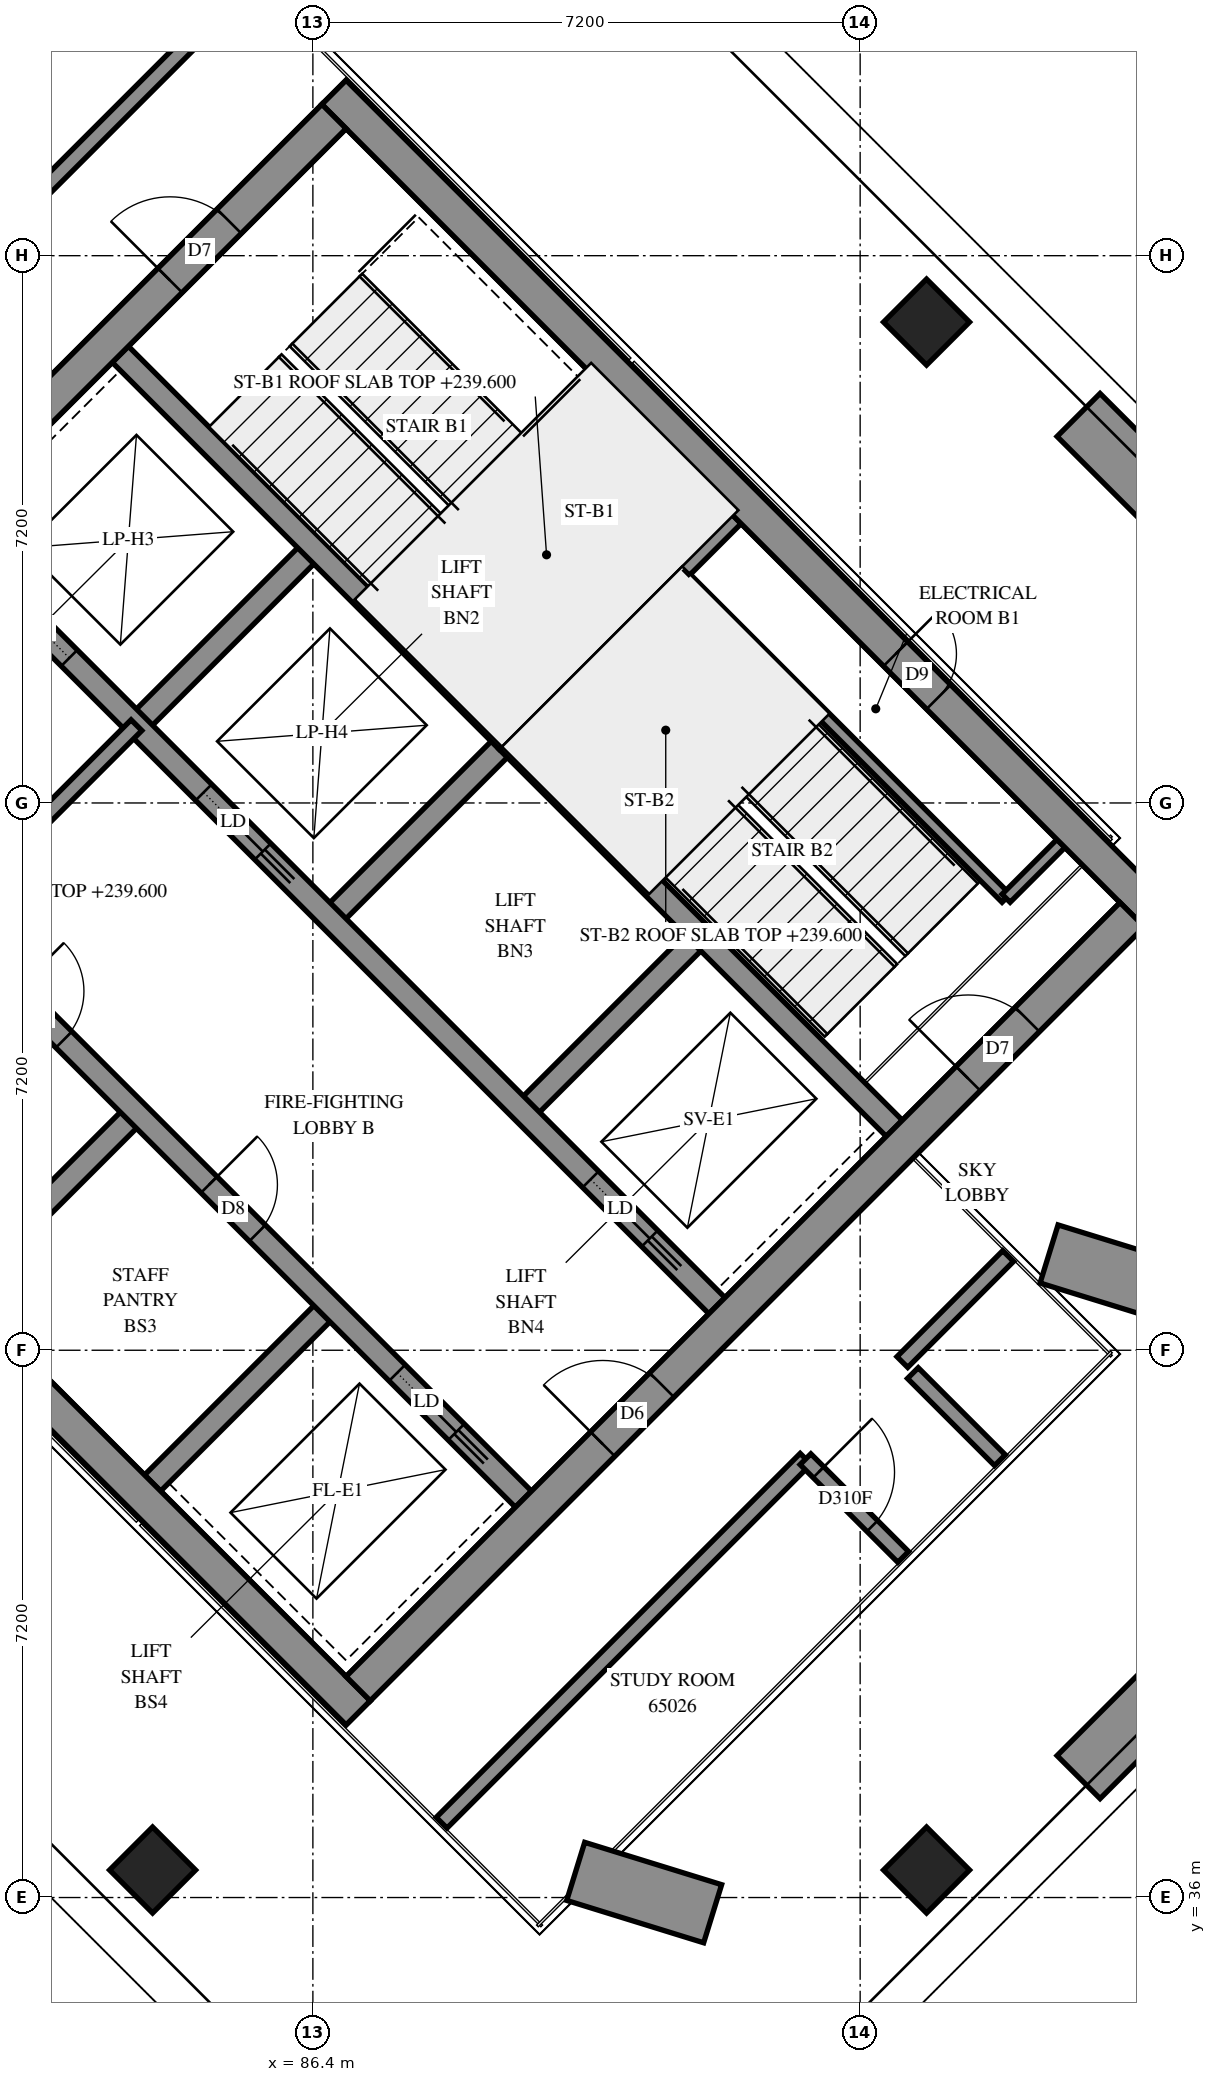
"""IFC4 building model, lengths in metres.
Left out: names, types, materials, properties, quantities, classifications, styles, units other than length and angle.
Written with IfcOpenShell. Run it as: python <this file> out.ifc"""

import sys

from ifc_helpers import new_model, si_unit, direction, frame, frame_2d, origin, origin_2d, place, context, subcontext, project, spatial, rectangle, extrude, element, fill, save


model = new_model("IFC4")
c1 = context("Model", 3, precision=1e-05, world=origin(), true_north=direction((0.0, 1.0)))
c2 = subcontext(c1, "Body", "Model", "MODEL_VIEW")
j1 = project(units=[si_unit("LENGTHUNIT", "METRE"), si_unit("PLANEANGLEUNIT", "RADIAN")], contexts=[c1])
p1 = place(None, origin())
s1 = spatial("IfcSite", under=j1, at=p1, CompositionType="ELEMENT")
p2 = place(p1, origin())
s2 = spatial("IfcBuilding", under=s1, at=p2, CompositionType="ELEMENT")
p3 = place(p2, frame((0.0, 0.0, 239.6)))
s3 = spatial("IfcBuildingStorey", under=s2, at=p3, CompositionType="ELEMENT", Elevation=239.6)
for number, where, z_axis, x_axis in (
    (1, (94.474, 56.727, 0.0), (0.0, 0.0, 1.0), (0.707, -0.707, 0.0)),
    (2, (84.291, 36.362, 0.0), (0.0, 0.0, 1.0), (0.707, -0.707, 0.0)),
    (3, (94.474, 36.362, 0.0), (0.0, 0.0, 1.0), (0.707, -0.707, 0.0)),
):
    element("IfcColumn", number, at=place(p3, frame(where, z_axis=z_axis, x_axis=x_axis)), inside=s3, PredefinedType="COLUMN", context=c2, shape_type="SweptSolid", body=[
        extrude(rectangle(XDim=0.8, YDim=0.8, at=origin_2d()), origin(), (0.0, 0.0, 1.0), 3.9),
    ])
p4 = place(p3, frame((76.177, 49.249, -0.3), z_axis=(0.0, 0.0, 1.0), x_axis=(0.7071100491, -0.7071035132, 0.0)))
e4 = element("IfcWall", 4, at=p4, inside=s3, PredefinedType="SHEAR", context=c2, shape_type="SweptSolid", body=[
    extrude(rectangle(XDim=15.3, YDim=0.45, at=frame_2d((7.65, 0.0))), origin(), (0.0, 0.0, 1.0), 3.5),
])
p5 = place(p3, frame((86.678, 59.749, -0.3), z_axis=(0.0, 0.0, 1.0), x_axis=(0.7071035132, -0.7071100491, 0.0)))
e5 = element("IfcWall", 5, at=p5, inside=s3, PredefinedType="SHEAR", context=c2, shape_type="SweptSolid", body=[
    extrude(rectangle(XDim=15.3, YDim=0.45, at=frame_2d((7.65, 0.0))), origin(), (0.0, 0.0, 1.0), 3.5),
])
p6 = place(p5, frame((10.45, 0.0, 0.3)))
e6 = element("IfcOpeningElement", 6, at=p6, cuts=e5, PredefinedType="OPENING", context=c2, shape_type="SweptSolid", body=[
    extrude(rectangle(XDim=0.8, YDim=2.1, at=frame_2d((0.4, 1.05))), frame((0.0, 0.235, 0.0), z_axis=(0.0, -1.0, 0.0), x_axis=(1.0, 0.0, 0.0)), (0.0, 0.0, 1.0), 0.47),
])
p7 = place(p3, frame((76.495, 49.249, -0.3), z_axis=(0.0, 0.0, 1.0), x_axis=(0.7071067812, 0.7071067812, 0.0)))
e7 = element("IfcWall", 7, at=p7, inside=s3, PredefinedType="SHEAR", context=c2, shape_type="SweptSolid", body=[
    extrude(rectangle(XDim=14.4, YDim=0.45, at=frame_2d((7.2, 0.0))), origin(), (0.0, 0.0, 1.0), 3.5),
])
p8 = place(p7, frame((4.55, 0.0, 0.3)))
e8 = element("IfcOpeningElement", 8, at=p8, cuts=e7, PredefinedType="OPENING", context=c2, shape_type="SweptSolid", body=[
    extrude(rectangle(XDim=1.1, YDim=2.1, at=frame_2d((0.55, 1.05))), frame((0.0, 0.235, 0.0), z_axis=(0.0, -1.0, 0.0), x_axis=(1.0, 0.0, 0.0)), (0.0, 0.0, 1.0), 0.47),
])
p9 = place(p7, frame((11.35, 0.0, 0.3)))
e9 = element("IfcOpeningElement", 9, at=p9, cuts=e7, PredefinedType="OPENING", context=c2, shape_type="SweptSolid", body=[
    extrude(rectangle(XDim=1.1, YDim=2.1, at=frame_2d((0.55, 1.05))), frame((0.0, 0.235, 0.0), z_axis=(0.0, -1.0, 0.0), x_axis=(1.0, 0.0, 0.0)), (0.0, 0.0, 1.0), 0.47),
])
p10 = place(p3, frame((86.996, 38.748, -0.3), z_axis=(0.0, 0.0, 1.0), x_axis=(0.7071067812, 0.7071067812, 0.0)))
e10 = element("IfcWall", 10, at=p10, inside=s3, PredefinedType="SHEAR", context=c2, shape_type="SweptSolid", body=[
    extrude(rectangle(XDim=14.4, YDim=0.45, at=frame_2d((7.2, 0.0))), origin(), (0.0, 0.0, 1.0), 3.5),
])
p11 = place(p10, frame((4.55, 0.0, 0.3)))
e11 = element("IfcOpeningElement", 11, at=p11, cuts=e10, PredefinedType="OPENING", context=c2, shape_type="SweptSolid", body=[
    extrude(rectangle(XDim=1.1, YDim=2.1, at=frame_2d((0.55, 1.05))), frame((0.0, 0.235, 0.0), z_axis=(0.0, -1.0, 0.0), x_axis=(1.0, 0.0, 0.0)), (0.0, 0.0, 1.0), 0.47),
])
p12 = place(p10, frame((11.35, 0.0, 0.3)))
e12 = element("IfcOpeningElement", 12, at=p12, cuts=e10, PredefinedType="OPENING", context=c2, shape_type="SweptSolid", body=[
    extrude(rectangle(XDim=1.1, YDim=2.1, at=frame_2d((0.55, 1.05))), frame((0.0, 0.235, 0.0), z_axis=(0.0, -1.0, 0.0), x_axis=(1.0, 0.0, 0.0)), (0.0, 0.0, 1.0), 0.47),
])
p13 = place(p3, frame((84.079, 51.423, 0.0), z_axis=(0.0, 0.0, 1.0), x_axis=(0.7071219326, 0.7070916295, 0.0)))
e13 = element("IfcWall", 13, at=p13, inside=s3, PredefinedType="SOLIDWALL", context=c2, shape_type="SweptSolid", body=[
    extrude(rectangle(XDim=3.3, YDim=0.3, at=frame_2d((1.65, 0.0))), origin(), (0.0, 0.0, 1.0), 3.9),
])
p14 = place(p3, frame((81.746, 43.999, 0.0), z_axis=(0.0, 0.0, 1.0), x_axis=(0.7071067812, 0.7071067812, 0.0)))
e14 = element("IfcWall", 14, at=p14, inside=s3, PredefinedType="SOLIDWALL", context=c2, shape_type="SweptSolid", body=[
    extrude(rectangle(XDim=3.3, YDim=0.3, at=frame_2d((1.65, 0.0))), origin(), (0.0, 0.0, 1.0), 3.9),
])
p15 = place(p3, frame((86.625, 48.878, 0.0), z_axis=(0.0, 0.0, 1.0), x_axis=(0.7071067812, 0.7071067812, 0.0)))
e15 = element("IfcWall", 15, at=p15, inside=s3, PredefinedType="SOLIDWALL", context=c2, shape_type="SweptSolid", body=[
    extrude(rectangle(XDim=3.3, YDim=0.3, at=frame_2d((1.65, 0.0))), origin(), (0.0, 0.0, 1.0), 3.9),
])
p16 = place(p3, frame((84.291, 41.453, 0.0), z_axis=(0.0, 0.0, 1.0), x_axis=(0.7071067812, 0.7071067812, 0.0)))
e16 = element("IfcWall", 16, at=p16, inside=s3, PredefinedType="SOLIDWALL", context=c2, shape_type="SweptSolid", body=[
    extrude(rectangle(XDim=3.3, YDim=0.3, at=frame_2d((1.65, 0.0))), origin(), (0.0, 0.0, 1.0), 3.9),
])
p17 = place(p3, frame((89.17, 46.332, 0.0), z_axis=(0.0, 0.0, 1.0), x_axis=(0.7071067812, 0.7071067812, 0.0)))
e17 = element("IfcWall", 17, at=p17, inside=s3, PredefinedType="SOLIDWALL", context=c2, shape_type="SweptSolid", body=[
    extrude(rectangle(XDim=3.3, YDim=0.3, at=frame_2d((1.65, 0.0))), origin(), (0.0, 0.0, 1.0), 3.9),
])
p18 = place(p3, frame((78.988, 51.423, 0.0), z_axis=(0.0, 0.0, 1.0), x_axis=(0.7071067812, -0.7071067812, 0.0)))
e18 = element("IfcWall", 18, at=p18, inside=s3, PredefinedType="SOLIDWALL", context=c2, shape_type="SweptSolid", body=[
    extrude(rectangle(XDim=14.4, YDim=0.3, at=frame_2d((7.2, 0.0))), origin(), (0.0, 0.0, 1.0), 3.9),
])
p19 = place(p18, frame((1.35, 0.0, 0.0)))
e19 = element("IfcOpeningElement", 19, at=p19, cuts=e18, PredefinedType="OPENING", context=c2, shape_type="SweptSolid", body=[
    extrude(rectangle(XDim=0.9, YDim=2.1, at=frame_2d((0.45, 1.05))), frame((0.0, 0.16, 0.0), z_axis=(0.0, -1.0, 0.0), x_axis=(1.0, 0.0, 0.0)), (0.0, 0.0, 1.0), 0.32),
])
p20 = place(p18, frame((4.95, 0.0, 0.0)))
e20 = element("IfcOpeningElement", 20, at=p20, cuts=e18, PredefinedType="OPENING", context=c2, shape_type="SweptSolid", body=[
    extrude(rectangle(XDim=0.9, YDim=2.1, at=frame_2d((0.45, 1.05))), frame((0.0, 0.16, 0.0), z_axis=(0.0, -1.0, 0.0), x_axis=(1.0, 0.0, 0.0)), (0.0, 0.0, 1.0), 0.32),
])
p21 = place(p18, frame((8.55, 0.0, 0.0)))
e21 = element("IfcOpeningElement", 21, at=p21, cuts=e18, PredefinedType="OPENING", context=c2, shape_type="SweptSolid", body=[
    extrude(rectangle(XDim=0.9, YDim=2.1, at=frame_2d((0.45, 1.05))), frame((0.0, 0.16, 0.0), z_axis=(0.0, -1.0, 0.0), x_axis=(1.0, 0.0, 0.0)), (0.0, 0.0, 1.0), 0.32),
])
p22 = place(p18, frame((12.05, 0.0, 0.0)))
e22 = element("IfcOpeningElement", 22, at=p22, cuts=e18, PredefinedType="OPENING", context=c2, shape_type="SweptSolid", body=[
    extrude(rectangle(XDim=1.1, YDim=2.1, at=frame_2d((0.55, 1.05))), frame((0.0, 0.16, 0.0), z_axis=(0.0, -1.0, 0.0), x_axis=(1.0, 0.0, 0.0)), (0.0, 0.0, 1.0), 0.32),
])
p23 = place(p3, frame((81.534, 53.969, 0.0), z_axis=(0.0, 0.0, 1.0), x_axis=(0.707103309, -0.7071102534, 0.0)))
e23 = element("IfcWall", 23, at=p23, inside=s3, PredefinedType="SOLIDWALL", context=c2, shape_type="SweptSolid", body=[
    extrude(rectangle(XDim=14.4, YDim=0.3, at=frame_2d((7.2, 0.0))), origin(), (0.0, 0.0, 1.0), 3.9),
])
p24 = place(p23, frame((1.25, 0.0, 0.0)))
e24 = element("IfcOpeningElement", 24, at=p24, cuts=e23, PredefinedType="OPENING", context=c2, shape_type="SweptSolid", body=[
    extrude(rectangle(XDim=1.1, YDim=2.1, at=frame_2d((0.55, 1.05))), frame((0.0, 0.16, 0.0), z_axis=(0.0, -1.0, 0.0), x_axis=(1.0, 0.0, 0.0)), (0.0, 0.0, 1.0), 0.32),
])
p25 = place(p23, frame((4.85, 0.0, 0.0)))
e25 = element("IfcOpeningElement", 25, at=p25, cuts=e23, PredefinedType="OPENING", context=c2, shape_type="SweptSolid", body=[
    extrude(rectangle(XDim=1.1, YDim=2.1, at=frame_2d((0.55, 1.05))), frame((0.0, 0.16, 0.0), z_axis=(0.0, -1.0, 0.0), x_axis=(1.0, 0.0, 0.0)), (0.0, 0.0, 1.0), 0.32),
])
p26 = place(p23, frame((12.05, 0.0, 0.0)))
e26 = element("IfcOpeningElement", 26, at=p26, cuts=e23, PredefinedType="OPENING", context=c2, shape_type="SweptSolid", body=[
    extrude(rectangle(XDim=1.1, YDim=2.1, at=frame_2d((0.55, 1.05))), frame((0.0, 0.16, 0.0), z_axis=(0.0, -1.0, 0.0), x_axis=(1.0, 0.0, 0.0)), (0.0, 0.0, 1.0), 0.32),
])
for number, where, z_axis, x_axis in (
    (27, (83.867, 56.302, 0.0), (0.0, 0.0, 1.0), (0.707, -0.707, 0.0)),
    (28, (88.958, 51.211, 0.0), (0.0, 0.0, 1.0), (0.707, -0.707, 0.0)),
):
    element("IfcWall", number, at=place(p3, frame(where, z_axis=z_axis, x_axis=x_axis)), inside=s3, PredefinedType="SOLIDWALL", context=c2, shape_type="SweptSolid", body=[
        extrude(rectangle(XDim=7.2, YDim=0.3, at=frame_2d((3.6, 0.0))), origin(), (0.0, 0.0, 1.0), 3.9),
    ])
p27 = place(p3, frame((88.958, 51.211, 0.0), z_axis=(0.0, 0.0, 1.0), x_axis=(0.7071067812, 0.7071067812, 0.0)))
e29 = element("IfcWall", 29, at=p27, inside=s3, PredefinedType="SOLIDWALL", context=c2, shape_type="SweptSolid", body=[
    extrude(rectangle(XDim=4.2, YDim=0.3, at=frame_2d((2.1, 0.0))), origin(), (0.0, 0.0, 1.0), 3.9),
])
for number, where, z_axis, x_axis in (
    (30, (96.474, 37.584, 0.0), (0.0, 0.0, 1.0), (0.707, 0.707, 0.0)),
    (31, (98.343, 53.635, 0.0), (0.0, 0.0, 1.0), (-0.707, 0.707, 0.0)),
):
    element("IfcWall", number, at=place(p3, frame(where, z_axis=z_axis, x_axis=x_axis)), inside=s3, PredefinedType="SOLIDWALL", context=c2, shape_type="SweptSolid", body=[
        extrude(rectangle(XDim=2.643, YDim=0.8, at=frame_2d((1.322, 0.0))), origin(), (0.0, 0.0, 1.0), 0.65),
    ])
p28 = place(p3, frame((99.073, 43.543, 0.0), z_axis=(0.0, 0.0, 1.0), x_axis=(-0.9553611302, 0.295440537, 0.0)))
e32 = element("IfcWall", 32, at=p28, inside=s3, PredefinedType="SOLIDWALL", context=c2, shape_type="SweptSolid", body=[
    extrude(rectangle(XDim=3.127, YDim=0.8, at=frame_2d((1.564, 0.0))), origin(), (0.0, 0.0, 1.0), 0.65),
])
p29 = place(p3, frame((91.659, 35.787, 0.0), z_axis=(0.0, 0.0, 1.0), x_axis=(-0.9553618261, 0.2954382866, 0.0)))
e33 = element("IfcWall", 33, at=p29, inside=s3, PredefinedType="SOLIDWALL", context=c2, shape_type="SweptSolid", body=[
    extrude(rectangle(XDim=1.886, YDim=0.8, at=frame_2d((0.943, 0.0))), origin(), (0.0, 0.0, 1.0), 0.65),
])
p30 = place(p3, frame((91.313, 53.354, 0.0), z_axis=(0.0, 0.0, 1.0), x_axis=(0.7071067812, -0.7071067812, 0.0)))
e34 = element("IfcWall", 34, at=p30, inside=s3, PredefinedType="PARTITIONING", context=c2, shape_type="SweptSolid", body=[
    extrude(rectangle(XDim=5.95, YDim=0.15, at=frame_2d((2.975, 0.0))), origin(), (0.0, 0.0, 1.0), 3.9),
])
p31 = place(p3, frame((95.52, 49.146, 0.0), z_axis=(0.0, 0.0, 1.0), x_axis=(0.7071067812, 0.7071067812, 0.0)))
e35 = element("IfcWall", 35, at=p31, inside=s3, PredefinedType="PARTITIONING", context=c2, shape_type="SweptSolid", body=[
    extrude(rectangle(XDim=1.02, YDim=0.15, at=frame_2d((0.51, 0.0))), origin(), (0.0, 0.0, 1.0), 3.9),
])
p32 = place(p3, frame((81.534, 48.878, 0.0), z_axis=(0.0, 0.0, 1.0), x_axis=(0.707092892, 0.7071206701, 0.0)))
e36 = element("IfcWall", 36, at=p32, inside=s3, PredefinedType="PARTITIONING", context=c2, shape_type="SweptSolid", body=[
    extrude(rectangle(XDim=3.6, YDim=0.2, at=frame_2d((1.8, 0.0))), origin(), (0.0, 0.0, 1.0), 3.9),
])
p33 = place(p3, frame((88.094, 36.984, 0.0), z_axis=(0.0, 0.0, 1.0), x_axis=(0.7071067812, 0.7071067812, 0.0)))
e37 = element("IfcWall", 37, at=p33, inside=s3, PredefinedType="PARTITIONING", context=c2, shape_type="SweptSolid", body=[
    extrude(rectangle(XDim=6.771, YDim=0.2, at=frame_2d((3.386, 0.0))), origin(), (0.0, 0.0, 1.0), 3.9),
])
p34 = place(p3, frame((80.852, 56.471, 0.0), z_axis=(0.0, 0.0, 1.0), x_axis=(0.7071067812, 0.7071067812, 0.0)))
e38 = element("IfcWall", 38, at=p34, inside=s3, PredefinedType="PARTITIONING", context=c2, shape_type="SweptSolid", body=[
    extrude(rectangle(XDim=6.684, YDim=0.2, at=frame_2d((3.342, 0.0))), origin(), (0.0, 0.0, 1.0), 3.9),
])
p35 = place(p34, frame((0.832, 0.0, 0.0)))
e39 = element("IfcOpeningElement", 39, at=p35, cuts=e38, PredefinedType="OPENING", context=c2, shape_type="SweptSolid", body=[
    extrude(rectangle(XDim=1.0, YDim=2.1, at=frame_2d((0.5, 1.05))), frame((0.0, 0.11, 0.0), z_axis=(0.0, -1.0, 0.0), x_axis=(1.0, 0.0, 0.0)), (0.0, 0.0, 1.0), 0.22),
])
p36 = place(p3, frame((94.155, 43.045, 0.0), z_axis=(0.0, 0.0, 1.0), x_axis=(0.7065989848, 0.7076142132, 0.0)))
e40 = element("IfcWall", 40, at=p36, inside=s3, PredefinedType="PARTITIONING", context=c2, shape_type="SweptSolid", body=[
    extrude(rectangle(XDim=1.97, YDim=0.2, at=frame_2d((0.985, 0.0))), origin(), (0.0, 0.0, 1.0), 3.9),
])
p37 = place(p3, frame((92.881, 41.767, 0.0), z_axis=(0.0, 0.0, 1.0), x_axis=(0.7071067812, -0.7071067812, 0.0)))
e41 = element("IfcWall", 41, at=p37, inside=s3, PredefinedType="PARTITIONING", context=c2, shape_type="SweptSolid", body=[
    extrude(rectangle(XDim=1.819, YDim=0.2, at=frame_2d((0.909, 0.0))), origin(), (0.0, 0.0, 1.0), 3.9),
])
p38 = place(p37, frame((0.243, 0.0, 0.0)))
e42 = element("IfcOpeningElement", 42, at=p38, cuts=e41, PredefinedType="OPENING", context=c2, shape_type="SweptSolid", body=[
    extrude(rectangle(XDim=1.0, YDim=2.1, at=frame_2d((0.5, 1.05))), frame((0.0, 0.11, 0.0), z_axis=(0.0, -1.0, 0.0), x_axis=(1.0, 0.0, 0.0)), (0.0, 0.0, 1.0), 0.22),
])
p39 = place(p3, frame((94.293, 42.899, 0.0), z_axis=(0.0, 0.0, 1.0), x_axis=(0.7071067812, -0.7071067812, 0.0)))
e43 = element("IfcWall", 43, at=p39, inside=s3, PredefinedType="PARTITIONING", context=c2, shape_type="SweptSolid", body=[
    extrude(rectangle(XDim=1.621, YDim=0.2, at=frame_2d((0.81, 0.0))), origin(), (0.0, 0.0, 1.0), 3.9),
])
p40 = place(p6, origin())
e44 = element("IfcDoor", 44, at=p40, inside=s3, OperationType="SINGLE_SWING_RIGHT", PredefinedType="DOOR", context=c2, shape_type="SweptSolid", body=[
    extrude(rectangle(XDim=0.8, YDim=2.1, at=frame_2d((0.4, 1.05))), frame((0.0, 0.025, 0.0), z_axis=(0.0, -1.0, 0.0), x_axis=(1.0, 0.0, 0.0)), (0.0, 0.0, 1.0), 0.05),
])
fill(e6, e44)
p41 = place(p11, origin())
e45 = element("IfcDoor", 45, at=p41, inside=s3, OperationType="DOUBLE_DOOR_SINGLE_SWING", PredefinedType="DOOR", context=c2, shape_type="SweptSolid", body=[
    extrude(rectangle(XDim=1.1, YDim=2.1, at=frame_2d((0.55, 1.05))), frame((0.0, 0.025, 0.0), z_axis=(0.0, -1.0, 0.0), x_axis=(1.0, 0.0, 0.0)), (0.0, 0.0, 1.0), 0.05),
])
fill(e11, e45)
p42 = place(p9, origin())
e46 = element("IfcDoor", 46, at=p42, inside=s3, OperationType="SINGLE_SWING_LEFT", PredefinedType="DOOR", context=c2, shape_type="SweptSolid", body=[
    extrude(rectangle(XDim=1.1, YDim=2.1, at=frame_2d((0.55, 1.05))), frame((0.0, 0.025, 0.0), z_axis=(0.0, -1.0, 0.0), x_axis=(1.0, 0.0, 0.0)), (0.0, 0.0, 1.0), 0.05),
])
fill(e9, e46)
p43 = place(p12, origin())
e47 = element("IfcDoor", 47, at=p43, inside=s3, OperationType="SINGLE_SWING_RIGHT", PredefinedType="DOOR", context=c2, shape_type="SweptSolid", body=[
    extrude(rectangle(XDim=1.1, YDim=2.1, at=frame_2d((0.55, 1.05))), frame((0.0, 0.025, 0.0), z_axis=(0.0, -1.0, 0.0), x_axis=(1.0, 0.0, 0.0)), (0.0, 0.0, 1.0), 0.05),
])
fill(e12, e47)
p44 = place(p20, origin())
e48 = element("IfcDoor", 48, at=p44, inside=s3, OperationType="SINGLE_SWING_LEFT", PredefinedType="DOOR", context=c2, shape_type="SweptSolid", body=[
    extrude(rectangle(XDim=0.9, YDim=2.1, at=frame_2d((0.45, 1.05))), frame((0.0, 0.025, 0.0), z_axis=(0.0, -1.0, 0.0), x_axis=(1.0, 0.0, 0.0)), (0.0, 0.0, 1.0), 0.05),
])
fill(e20, e48)
p45 = place(p21, origin())
e49 = element("IfcDoor", 49, at=p45, inside=s3, OperationType="SINGLE_SWING_LEFT", PredefinedType="DOOR", context=c2, shape_type="SweptSolid", body=[
    extrude(rectangle(XDim=0.9, YDim=2.1, at=frame_2d((0.45, 1.05))), frame((0.0, 0.025, 0.0), z_axis=(0.0, -1.0, 0.0), x_axis=(1.0, 0.0, 0.0)), (0.0, 0.0, 1.0), 0.05),
])
fill(e21, e49)
p46 = place(p22, origin())
e50 = element("IfcDoor", 50, at=p46, inside=s3, OperationType="SLIDING_TO_RIGHT", PredefinedType="DOOR", context=c2, shape_type="SweptSolid", body=[
    extrude(rectangle(XDim=1.1, YDim=2.1, at=frame_2d((0.55, 1.05))), frame((0.0, 0.025, 0.0), z_axis=(0.0, -1.0, 0.0), x_axis=(1.0, 0.0, 0.0)), (0.0, 0.0, 1.0), 0.05),
])
fill(e22, e50)
p47 = place(p24, origin())
e51 = element("IfcDoor", 51, at=p47, inside=s3, OperationType="SLIDING_TO_LEFT", PredefinedType="DOOR", context=c2, shape_type="SweptSolid", body=[
    extrude(rectangle(XDim=1.1, YDim=2.1, at=frame_2d((0.55, 1.05))), frame((0.0, 0.025, 0.0), z_axis=(0.0, -1.0, 0.0), x_axis=(1.0, 0.0, 0.0)), (0.0, 0.0, 1.0), 0.05),
])
fill(e24, e51)
p48 = place(p25, origin())
e52 = element("IfcDoor", 52, at=p48, inside=s3, OperationType="SLIDING_TO_RIGHT", PredefinedType="DOOR", context=c2, shape_type="SweptSolid", body=[
    extrude(rectangle(XDim=1.1, YDim=2.1, at=frame_2d((0.55, 1.05))), frame((0.0, 0.025, 0.0), z_axis=(0.0, -1.0, 0.0), x_axis=(1.0, 0.0, 0.0)), (0.0, 0.0, 1.0), 0.05),
])
fill(e25, e52)
p49 = place(p26, origin())
e53 = element("IfcDoor", 53, at=p49, inside=s3, OperationType="SLIDING_TO_RIGHT", PredefinedType="DOOR", context=c2, shape_type="SweptSolid", body=[
    extrude(rectangle(XDim=1.1, YDim=2.1, at=frame_2d((0.55, 1.05))), frame((0.0, 0.025, 0.0), z_axis=(0.0, -1.0, 0.0), x_axis=(1.0, 0.0, 0.0)), (0.0, 0.0, 1.0), 0.05),
])
fill(e26, e53)
p50 = place(p38, origin())
e54 = element("IfcDoor", 54, at=p50, inside=s3, OperationType="SINGLE_SWING_LEFT", PredefinedType="DOOR", context=c2, shape_type="SweptSolid", body=[
    extrude(rectangle(XDim=1.0, YDim=2.1, at=frame_2d((0.5, 1.05))), frame((0.0, 0.025, 0.0), z_axis=(0.0, -1.0, 0.0), x_axis=(1.0, 0.0, 0.0)), (0.0, 0.0, 1.0), 0.05),
])
fill(e42, e54)
save(model, sys.argv[1])
